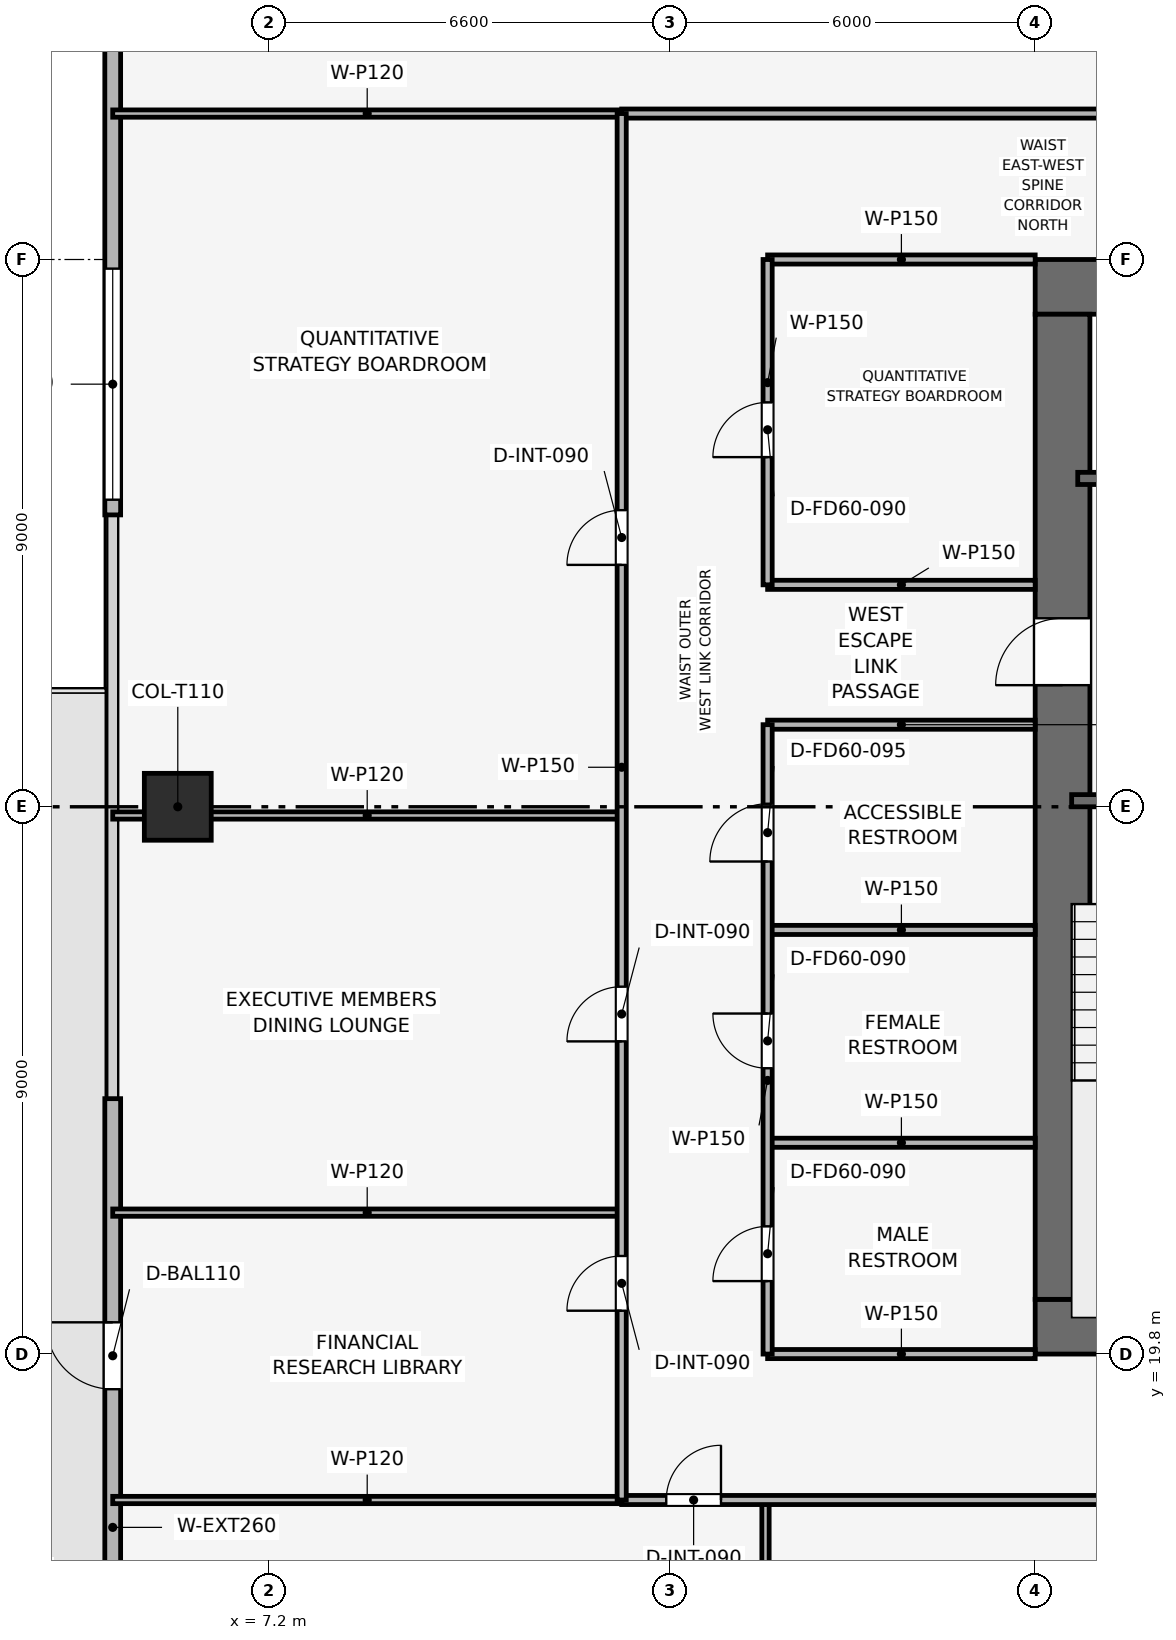
"""IFC4 building model, lengths in metres.
Left out: names, types, materials, properties, quantities, classifications, styles, units other than length and angle.
Written with IfcOpenShell. Run it as: python <this file> out.ifc"""

import sys

from ifc_helpers import new_model, si_unit, direction, frame, frame_2d, origin, origin_2d, place, context, subcontext, project, spatial, rectangle, extrude, element, fill, save


model = new_model("IFC4")
c1 = context("Model", 3, precision=1e-05, world=origin(), true_north=direction((0.0, 1.0)))
c2 = subcontext(c1, "Body", "Model", "MODEL_VIEW")
j1 = project(units=[si_unit("LENGTHUNIT", "METRE"), si_unit("PLANEANGLEUNIT", "RADIAN")], contexts=[c1])
p1 = place(None, origin())
s1 = spatial("IfcSite", under=j1, at=p1, CompositionType="ELEMENT")
p2 = place(p1, origin())
s2 = spatial("IfcBuilding", under=s1, at=p2, CompositionType="ELEMENT")
p3 = place(p2, frame((0.0, 0.0, 142.05)))
s3 = spatial("IfcBuildingStorey", under=s2, at=p3, CompositionType="ELEMENT", Elevation=142.05)
p4 = place(p3, frame((19.8, 20.25, 0.0), z_axis=(0.0, 0.0, 1.0), x_axis=(1.0, 0.0, 0.0)))
e1 = element("IfcWall", 1, at=p4, inside=s3, PredefinedType="SHEAR", context=c2, shape_type="SweptSolid", body=[
    extrude(rectangle(XDim=18.0, YDim=0.9, at=frame_2d((9.0, 0.0))), origin(), (0.0, 0.0, 1.0), 3.75),
])
p5 = place(p4, frame((8.4, 0.0, 0.0)))
e2 = element("IfcOpeningElement", 2, at=p5, cuts=e1, PredefinedType="OPENING", context=c2, shape_type="SweptSolid", body=[
    extrude(rectangle(XDim=1.2, YDim=2.2, at=frame_2d((0.6, 1.1))), frame((0.0, 0.46, 0.0), z_axis=(0.0, -1.0, 0.0), x_axis=(1.0, 0.0, 0.0)), (0.0, 0.0, 1.0), 0.92),
])
p6 = place(p3, frame((19.8, 37.35, 0.0), z_axis=(0.0, 0.0, 1.0), x_axis=(1.0, 0.0, 0.0)))
e3 = element("IfcWall", 3, at=p6, inside=s3, PredefinedType="SHEAR", context=c2, shape_type="SweptSolid", body=[
    extrude(rectangle(XDim=18.0, YDim=0.9, at=frame_2d((9.0, 0.0))), origin(), (0.0, 0.0, 1.0), 3.75),
])
p7 = place(p6, frame((7.05, 0.0, 0.0)))
e4 = element("IfcOpeningElement", 4, at=p7, cuts=e3, PredefinedType="OPENING", context=c2, shape_type="SweptSolid", body=[
    extrude(rectangle(XDim=1.1, YDim=2.15, at=frame_2d((0.55, 1.075))), frame((0.0, 0.46, 0.0), z_axis=(0.0, -1.0, 0.0), x_axis=(1.0, 0.0, 0.0)), (0.0, 0.0, 1.0), 0.92),
])
p8 = place(p3, frame((20.25, 20.7, 0.0), z_axis=(0.0, 0.0, 1.0), x_axis=(0.0, 1.0, 0.0)))
e5 = element("IfcWall", 5, at=p8, inside=s3, PredefinedType="SHEAR", context=c2, shape_type="SweptSolid", body=[
    extrude(rectangle(XDim=16.2, YDim=0.9, at=frame_2d((8.1, 0.0))), origin(), (0.0, 0.0, 1.0), 3.75),
])
p9 = place(p8, frame((10.1, 0.0, 0.0)))
e6 = element("IfcOpeningElement", 6, at=p9, cuts=e5, PredefinedType="OPENING", context=c2, shape_type="SweptSolid", body=[
    extrude(rectangle(XDim=1.1, YDim=2.15, at=frame_2d((0.55, 1.075))), frame((0.0, 0.46, 0.0), z_axis=(0.0, -1.0, 0.0), x_axis=(1.0, 0.0, 0.0)), (0.0, 0.0, 1.0), 0.92),
])
p10 = place(p3, frame((5.7, 28.8, 0.003), z_axis=(0.0, 0.0, 1.0), x_axis=(1.0, 0.0, 0.0)))
e7 = element("IfcColumn", 7, at=p10, inside=s3, PredefinedType="COLUMN", context=c2, shape_type="SweptSolid", body=[
    extrude(rectangle(XDim=1.1, YDim=1.1, at=origin_2d()), origin(), (0.0, 0.0, 1.0), 3.489),
])
p11 = place(p3, frame((4.63, 11.4, 0.0), z_axis=(0.0, 0.0, 1.0), x_axis=(0.0, 1.0, 0.0)))
e8 = element("IfcWall", 8, at=p11, inside=s3, PredefinedType="SOLIDWALL", context=c2, shape_type="SweptSolid", body=[
    extrude(rectangle(XDim=12.6, YDim=0.26, at=frame_2d((6.3, 0.0))), origin(), (0.0, 0.0, 1.0), 3.495),
])
p12 = place(p11, frame((7.822, 0.0, 0.0)))
e9 = element("IfcOpeningElement", 9, at=p12, cuts=e8, PredefinedType="OPENING", context=c2, shape_type="SweptSolid", body=[
    extrude(rectangle(XDim=1.1, YDim=2.2, at=frame_2d((0.55, 1.1))), frame((0.0, 0.14, 0.0), z_axis=(0.0, -1.0, 0.0), x_axis=(1.0, 0.0, 0.0)), (0.0, 0.0, 1.0), 0.28),
])
p13 = place(p3, frame((4.63, 33.6, 0.0), z_axis=(0.0, 0.0, 1.0), x_axis=(0.0, 1.0, 0.0)))
e10 = element("IfcWall", 10, at=p13, inside=s3, PredefinedType="SOLIDWALL", context=c2, shape_type="SweptSolid", body=[
    extrude(rectangle(XDim=12.6, YDim=0.26, at=frame_2d((6.3, 0.0))), origin(), (0.0, 0.0, 1.0), 3.495),
])
p14 = place(p13, frame((0.25, 0.0, 0.9)))
e11 = element("IfcOpeningElement", 11, at=p14, cuts=e10, PredefinedType="OPENING", context=c2, shape_type="SweptSolid", body=[
    extrude(rectangle(XDim=3.8, YDim=1.9, at=frame_2d((1.9, 0.95))), frame((0.0, 0.14, 0.0), z_axis=(0.0, -1.0, 0.0), x_axis=(1.0, 0.0, 0.0)), (0.0, 0.0, 1.0), 0.28),
])
p15 = place(p3, frame((20.4, 28.9, 0.0), z_axis=(0.0, 0.0, 1.0), x_axis=(1.0, 0.0, 0.0)))
e12 = element("IfcWall", 12, at=p15, inside=s3, PredefinedType="SHEAR", context=c2, shape_type="SweptSolid", body=[
    extrude(rectangle(XDim=3.15, YDim=0.2, at=frame_2d((1.575, 0.0))), origin(), (0.0, 0.0, 1.0), 3.495),
])
p16 = place(p15, frame((0.8, 0.0, 0.0)))
e13 = element("IfcOpeningElement", 13, at=p16, cuts=e12, PredefinedType="OPENING", context=c2, shape_type="SweptSolid", body=[
    extrude(rectangle(XDim=1.0, YDim=2.1, at=frame_2d((0.5, 1.05))), frame((0.0, 0.11, 0.0), z_axis=(0.0, -1.0, 0.0), x_axis=(1.0, 0.0, 0.0)), (0.0, 0.0, 1.0), 0.22),
])
p17 = place(p3, frame((20.5, 34.2, 0.0), z_axis=(0.0, 0.0, 1.0), x_axis=(1.0, 0.0, 0.0)))
e14 = element("IfcWall", 14, at=p17, inside=s3, PredefinedType="SHEAR", context=c2, shape_type="SweptSolid", body=[
    extrude(rectangle(XDim=3.05, YDim=0.2, at=frame_2d((1.525, 0.0))), origin(), (0.0, 0.0, 1.0), 3.495),
])
p18 = place(p17, frame((0.75, 0.0, 0.0)))
e15 = element("IfcOpeningElement", 15, at=p18, cuts=e14, PredefinedType="OPENING", context=c2, shape_type="SweptSolid", body=[
    extrude(rectangle(XDim=1.1, YDim=2.15, at=frame_2d((0.55, 1.075))), frame((0.0, 0.11, 0.0), z_axis=(0.0, -1.0, 0.0), x_axis=(1.0, 0.0, 0.0)), (0.0, 0.0, 1.0), 0.22),
])
p19 = place(p3, frame((15.4, 19.8, 0.0), z_axis=(0.0, 0.0, 1.0), x_axis=(1.0, 0.0, 0.0)))
e16 = element("IfcWall", 16, at=p19, inside=s3, PredefinedType="PARTITIONING", context=c2, shape_type="SweptSolid", body=[
    extrude(rectangle(XDim=4.4, YDim=0.15, at=frame_2d((2.2, 0.0))), origin(), (0.0, 0.0, 1.0), 3.03),
])
for number, where, z_axis, x_axis in (
    (17, (15.4, 23.275, 0.0), (0.0, 0.0, 1.0), (1.0, 0.0, 0.0)),
    (18, (15.4, 26.775, 0.0), (0.0, 0.0, 1.0), (1.0, 0.0, 0.0)),
    (19, (15.4, 30.15, 0.0), (0.0, 0.0, 1.0), (1.0, 0.0, 0.0)),
    (20, (15.4, 32.45, 0.0), (0.0, 0.0, 1.0), (1.0, 0.0, 0.0)),
):
    element("IfcWall", number, at=place(p3, frame(where, z_axis=z_axis, x_axis=x_axis)), inside=s3, PredefinedType="PARTITIONING", context=c2, shape_type="SweptSolid", body=[
        extrude(rectangle(XDim=4.4, YDim=0.15, at=frame_2d((2.2, 0.0))), origin(), (0.0, 0.0, 1.0), 3.495),
    ])
p20 = place(p3, frame((15.4, 37.8, 0.0), z_axis=(0.0, 0.0, 1.0), x_axis=(1.0, 0.0, 0.0)))
e21 = element("IfcWall", 21, at=p20, inside=s3, PredefinedType="PARTITIONING", context=c2, shape_type="SweptSolid", body=[
    extrude(rectangle(XDim=4.4, YDim=0.15, at=frame_2d((2.2, 0.0))), origin(), (0.0, 0.0, 1.0), 3.03),
])
p21 = place(p3, frame((15.4, 19.8, 0.0), z_axis=(0.0, 0.0, 1.0), x_axis=(0.0, 1.0, 0.0)))
e22 = element("IfcWall", 22, at=p21, inside=s3, PredefinedType="PARTITIONING", context=c2, shape_type="SweptSolid", body=[
    extrude(rectangle(XDim=10.35, YDim=0.15, at=frame_2d((5.175, 0.0))), origin(), (0.0, 0.0, 1.0), 3.03),
])
p22 = place(p21, frame((1.2, 0.0, 0.0)))
e23 = element("IfcOpeningElement", 23, at=p22, cuts=e22, PredefinedType="OPENING", context=c2, shape_type="SweptSolid", body=[
    extrude(rectangle(XDim=0.9, YDim=2.1, at=frame_2d((0.45, 1.05))), frame((0.0, 0.085, 0.0), z_axis=(0.0, -1.0, 0.0), x_axis=(1.0, 0.0, 0.0)), (0.0, 0.0, 1.0), 0.17),
])
p23 = place(p21, frame((4.7, 0.0, 0.0)))
e24 = element("IfcOpeningElement", 24, at=p23, cuts=e22, PredefinedType="OPENING", context=c2, shape_type="SweptSolid", body=[
    extrude(rectangle(XDim=0.9, YDim=2.1, at=frame_2d((0.45, 1.05))), frame((0.0, 0.085, 0.0), z_axis=(0.0, -1.0, 0.0), x_axis=(1.0, 0.0, 0.0)), (0.0, 0.0, 1.0), 0.17),
])
p24 = place(p21, frame((8.1, 0.0, 0.0)))
e25 = element("IfcOpeningElement", 25, at=p24, cuts=e22, PredefinedType="OPENING", context=c2, shape_type="SweptSolid", body=[
    extrude(rectangle(XDim=0.95, YDim=2.1, at=frame_2d((0.475, 1.05))), frame((0.0, 0.085, 0.0), z_axis=(0.0, -1.0, 0.0), x_axis=(1.0, 0.0, 0.0)), (0.0, 0.0, 1.0), 0.17),
])
p25 = place(p3, frame((15.4, 32.45, 0.0), z_axis=(0.0, 0.0, 1.0), x_axis=(0.0, 1.0, 0.0)))
e26 = element("IfcWall", 26, at=p25, inside=s3, PredefinedType="PARTITIONING", context=c2, shape_type="SweptSolid", body=[
    extrude(rectangle(XDim=5.35, YDim=0.15, at=frame_2d((2.675, 0.0))), origin(), (0.0, 0.0, 1.0), 3.03),
])
p26 = place(p25, frame((2.1, 0.0, 0.0)))
e27 = element("IfcOpeningElement", 27, at=p26, cuts=e26, PredefinedType="OPENING", context=c2, shape_type="SweptSolid", body=[
    extrude(rectangle(XDim=0.9, YDim=2.1, at=frame_2d((0.45, 1.05))), frame((0.0, 0.085, 0.0), z_axis=(0.0, -1.0, 0.0), x_axis=(1.0, 0.0, 0.0)), (0.0, 0.0, 1.0), 0.17),
])
p27 = place(p3, frame((15.365, 4.63, 0.0), z_axis=(0.0, 0.0, 1.0), x_axis=(0.0, 1.0, 0.0)))
e28 = element("IfcWall", 28, at=p27, inside=s3, PredefinedType="PARTITIONING", context=c2, shape_type="SweptSolid", body=[
    extrude(rectangle(XDim=12.77, YDim=0.12, at=frame_2d((6.385, 0.0))), origin(), (0.0, 0.0, 1.0), 2.98),
])
for number, where, z_axis, x_axis in (
    (29, (4.63, 22.126, 0.0), (0.0, 0.0, 1.0), (1.0, 0.0, 0.0)),
    (30, (4.63, 28.657, 0.0), (0.0, 0.0, 1.0), (1.0, 0.0, 0.0)),
    (31, (4.63, 17.4, 0.0), (0.0, 0.0, 1.0), (1.0, 0.0, 0.0)),
    (32, (4.63, 40.2, 0.0), (0.0, 0.0, 1.0), (1.0, 0.0, 0.0)),
):
    element("IfcWall", number, at=place(p3, frame(where, z_axis=z_axis, x_axis=x_axis)), inside=s3, PredefinedType="PARTITIONING", context=c2, shape_type="SweptSolid", body=[
        extrude(rectangle(XDim=8.37, YDim=0.12, at=frame_2d((4.185, 0.0))), origin(), (0.0, 0.0, 1.0), 2.98),
    ])
p28 = place(p3, frame((13.0, 17.4, 0.0), z_axis=(0.0, 0.0, 1.0), x_axis=(1.0, 0.0, 0.0)))
e33 = element("IfcWall", 33, at=p28, inside=s3, PredefinedType="PARTITIONING", context=c2, shape_type="SweptSolid", body=[
    extrude(rectangle(XDim=31.6, YDim=0.15, at=frame_2d((15.8, 0.0))), origin(), (0.0, 0.0, 1.0), 3.03),
])
p29 = place(p28, frame((0.733, 0.0, 0.0)))
e34 = element("IfcOpeningElement", 34, at=p29, cuts=e33, PredefinedType="OPENING", context=c2, shape_type="SweptSolid", body=[
    extrude(rectangle(XDim=0.9, YDim=2.1, at=frame_2d((0.45, 1.05))), frame((0.0, 0.085, 0.0), z_axis=(0.0, -1.0, 0.0), x_axis=(1.0, 0.0, 0.0)), (0.0, 0.0, 1.0), 0.17),
])
p30 = place(p28, frame((8.581, 0.0, 0.0)))
e35 = element("IfcOpeningElement", 35, at=p30, cuts=e33, PredefinedType="OPENING", context=c2, shape_type="SweptSolid", body=[
    extrude(rectangle(XDim=0.9, YDim=2.1, at=frame_2d((0.45, 1.05))), frame((0.0, 0.085, 0.0), z_axis=(0.0, -1.0, 0.0), x_axis=(1.0, 0.0, 0.0)), (0.0, 0.0, 1.0), 0.17),
])
p31 = place(p28, frame((23.198, 0.0, 0.0)))
e36 = element("IfcOpeningElement", 36, at=p31, cuts=e33, PredefinedType="OPENING", context=c2, shape_type="SweptSolid", body=[
    extrude(rectangle(XDim=0.9, YDim=2.1, at=frame_2d((0.45, 1.05))), frame((0.0, 0.085, 0.0), z_axis=(0.0, -1.0, 0.0), x_axis=(1.0, 0.0, 0.0)), (0.0, 0.0, 1.0), 0.17),
])
p32 = place(p3, frame((13.0, 40.2, 0.0), z_axis=(0.0, 0.0, 1.0), x_axis=(1.0, 0.0, 0.0)))
e37 = element("IfcWall", 37, at=p32, inside=s3, PredefinedType="PARTITIONING", context=c2, shape_type="SweptSolid", body=[
    extrude(rectangle(XDim=31.6, YDim=0.15, at=frame_2d((15.8, 0.0))), origin(), (0.0, 0.0, 1.0), 3.03),
])
p33 = place(p32, frame((15.35, 0.0, 0.0)))
e38 = element("IfcOpeningElement", 38, at=p33, cuts=e37, PredefinedType="OPENING", context=c2, shape_type="SweptSolid", body=[
    extrude(rectangle(XDim=0.9, YDim=2.1, at=frame_2d((0.45, 1.05))), frame((0.0, 0.085, 0.0), z_axis=(0.0, -1.0, 0.0), x_axis=(1.0, 0.0, 0.0)), (0.0, 0.0, 1.0), 0.17),
])
p34 = place(p3, frame((13.0, 17.4, 0.0), z_axis=(0.0, 0.0, 1.0), x_axis=(0.0, 1.0, 0.0)))
e39 = element("IfcWall", 39, at=p34, inside=s3, PredefinedType="PARTITIONING", context=c2, shape_type="SweptSolid", body=[
    extrude(rectangle(XDim=22.8, YDim=0.15, at=frame_2d((11.4, 0.0))), origin(), (0.0, 0.0, 1.0), 3.03),
])
p35 = place(p34, frame((3.113, 0.0, 0.0)))
e40 = element("IfcOpeningElement", 40, at=p35, cuts=e39, PredefinedType="OPENING", context=c2, shape_type="SweptSolid", body=[
    extrude(rectangle(XDim=0.9, YDim=2.1, at=frame_2d((0.45, 1.05))), frame((0.0, 0.085, 0.0), z_axis=(0.0, -1.0, 0.0), x_axis=(1.0, 0.0, 0.0)), (0.0, 0.0, 1.0), 0.17),
])
p36 = place(p34, frame((7.542, 0.0, 0.0)))
e41 = element("IfcOpeningElement", 41, at=p36, cuts=e39, PredefinedType="OPENING", context=c2, shape_type="SweptSolid", body=[
    extrude(rectangle(XDim=0.9, YDim=2.1, at=frame_2d((0.45, 1.05))), frame((0.0, 0.085, 0.0), z_axis=(0.0, -1.0, 0.0), x_axis=(1.0, 0.0, 0.0)), (0.0, 0.0, 1.0), 0.17),
])
p37 = place(p34, frame((15.378, 0.0, 0.0)))
e42 = element("IfcOpeningElement", 42, at=p37, cuts=e39, PredefinedType="OPENING", context=c2, shape_type="SweptSolid", body=[
    extrude(rectangle(XDim=0.9, YDim=2.1, at=frame_2d((0.45, 1.05))), frame((0.0, 0.085, 0.0), z_axis=(0.0, -1.0, 0.0), x_axis=(1.0, 0.0, 0.0)), (0.0, 0.0, 1.0), 0.17),
])
p38 = place(p12, origin())
e43 = element("IfcDoor", 43, at=p38, inside=s3, OperationType="SINGLE_SWING_RIGHT", PredefinedType="DOOR", context=c2, shape_type="SweptSolid", body=[
    extrude(rectangle(XDim=1.1, YDim=2.2, at=frame_2d((0.55, 1.1))), frame((0.0, 0.025, 0.0), z_axis=(0.0, -1.0, 0.0), x_axis=(1.0, 0.0, 0.0)), (0.0, 0.0, 1.0), 0.05),
])
fill(e9, e43)
p39 = place(p14, origin())
e44 = element("IfcWindow", 44, at=p39, inside=s3, PartitioningType="SINGLE_PANEL", PredefinedType="WINDOW", context=c2, shape_type="SweptSolid", body=[
    extrude(rectangle(XDim=3.8, YDim=1.9, at=frame_2d((1.9, 0.95))), frame((0.0, 0.03, 0.0), z_axis=(0.0, -1.0, 0.0), x_axis=(1.0, 0.0, 0.0)), (0.0, 0.0, 1.0), 0.06),
])
fill(e11, e44)
p40 = place(p22, origin())
e45 = element("IfcDoor", 45, at=p40, inside=s3, OperationType="SINGLE_SWING_LEFT", PredefinedType="DOOR", context=c2, shape_type="SweptSolid", body=[
    extrude(rectangle(XDim=0.9, YDim=2.1, at=frame_2d((0.45, 1.05))), frame((0.0, 0.025, 0.0), z_axis=(0.0, -1.0, 0.0), x_axis=(1.0, 0.0, 0.0)), (0.0, 0.0, 1.0), 0.05),
])
fill(e23, e45)
p41 = place(p23, origin())
e46 = element("IfcDoor", 46, at=p41, inside=s3, OperationType="SINGLE_SWING_RIGHT", PredefinedType="DOOR", context=c2, shape_type="SweptSolid", body=[
    extrude(rectangle(XDim=0.9, YDim=2.1, at=frame_2d((0.45, 1.05))), frame((0.0, 0.025, 0.0), z_axis=(0.0, -1.0, 0.0), x_axis=(1.0, 0.0, 0.0)), (0.0, 0.0, 1.0), 0.05),
])
fill(e24, e46)
p42 = place(p24, origin())
e47 = element("IfcDoor", 47, at=p42, inside=s3, OperationType="SINGLE_SWING_LEFT", PredefinedType="DOOR", context=c2, shape_type="SweptSolid", body=[
    extrude(rectangle(XDim=0.95, YDim=2.1, at=frame_2d((0.475, 1.05))), frame((0.0, 0.025, 0.0), z_axis=(0.0, -1.0, 0.0), x_axis=(1.0, 0.0, 0.0)), (0.0, 0.0, 1.0), 0.05),
])
fill(e25, e47)
p43 = place(p26, origin())
e48 = element("IfcDoor", 48, at=p43, inside=s3, OperationType="SINGLE_SWING_LEFT", PredefinedType="DOOR", context=c2, shape_type="SweptSolid", body=[
    extrude(rectangle(XDim=0.9, YDim=2.1, at=frame_2d((0.45, 1.05))), frame((0.0, 0.025, 0.0), z_axis=(0.0, -1.0, 0.0), x_axis=(1.0, 0.0, 0.0)), (0.0, 0.0, 1.0), 0.05),
])
fill(e27, e48)
p44 = place(p29, origin())
e49 = element("IfcDoor", 49, at=p44, inside=s3, OperationType="SINGLE_SWING_RIGHT", PredefinedType="DOOR", context=c2, shape_type="SweptSolid", body=[
    extrude(rectangle(XDim=0.9, YDim=2.1, at=frame_2d((0.45, 1.05))), frame((0.0, 0.025, 0.0), z_axis=(0.0, -1.0, 0.0), x_axis=(1.0, 0.0, 0.0)), (0.0, 0.0, 1.0), 0.05),
])
fill(e34, e49)
p45 = place(p35, origin())
e50 = element("IfcDoor", 50, at=p45, inside=s3, OperationType="SINGLE_SWING_LEFT", PredefinedType="DOOR", context=c2, shape_type="SweptSolid", body=[
    extrude(rectangle(XDim=0.9, YDim=2.1, at=frame_2d((0.45, 1.05))), frame((0.0, 0.025, 0.0), z_axis=(0.0, -1.0, 0.0), x_axis=(1.0, 0.0, 0.0)), (0.0, 0.0, 1.0), 0.05),
])
fill(e40, e50)
p46 = place(p36, origin())
e51 = element("IfcDoor", 51, at=p46, inside=s3, OperationType="SINGLE_SWING_LEFT", PredefinedType="DOOR", context=c2, shape_type="SweptSolid", body=[
    extrude(rectangle(XDim=0.9, YDim=2.1, at=frame_2d((0.45, 1.05))), frame((0.0, 0.025, 0.0), z_axis=(0.0, -1.0, 0.0), x_axis=(1.0, 0.0, 0.0)), (0.0, 0.0, 1.0), 0.05),
])
fill(e41, e51)
p47 = place(p37, origin())
e52 = element("IfcDoor", 52, at=p47, inside=s3, OperationType="SINGLE_SWING_LEFT", PredefinedType="DOOR", context=c2, shape_type="SweptSolid", body=[
    extrude(rectangle(XDim=0.9, YDim=2.1, at=frame_2d((0.45, 1.05))), frame((0.0, 0.025, 0.0), z_axis=(0.0, -1.0, 0.0), x_axis=(1.0, 0.0, 0.0)), (0.0, 0.0, 1.0), 0.05),
])
fill(e42, e52)
p48 = place(p9, origin())
e53 = element("IfcDoor", 53, at=p48, inside=s3, OperationType="SINGLE_SWING_LEFT", PredefinedType="DOOR", context=c2, shape_type="SweptSolid", body=[
    extrude(rectangle(XDim=1.1, YDim=2.15, at=frame_2d((0.55, 1.075))), frame((0.0, 0.025, 0.0), z_axis=(0.0, -1.0, 0.0), x_axis=(1.0, 0.0, 0.0)), (0.0, 0.0, 1.0), 0.05),
])
fill(e6, e53)
save(model, sys.argv[1])
